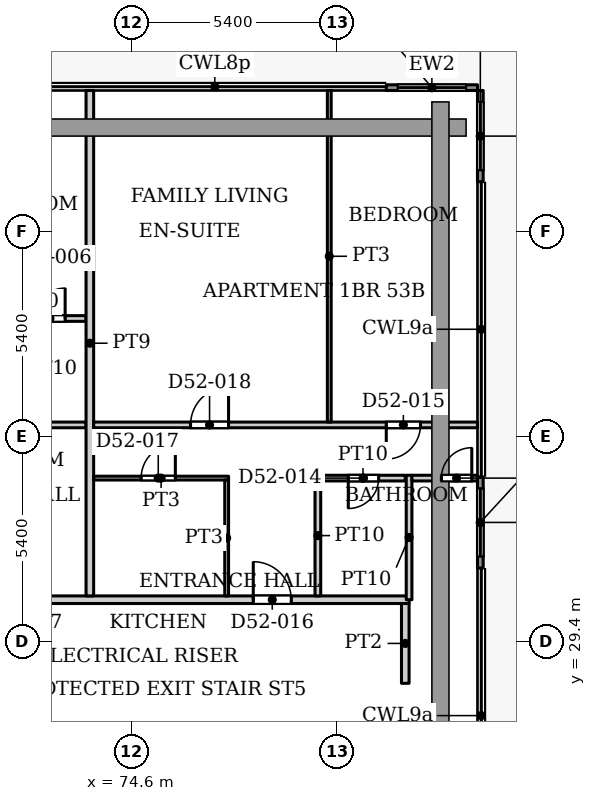
"""IFC4 building model, lengths in metres.
Left out: names, types, materials, properties, quantities, classifications, styles, units other than length and angle.
Written with IfcOpenShell. Run it as: python <this file> out.ifc"""

import sys

from ifc_helpers import new_model, si_unit, direction, frame, frame_2d, origin, place, context, subcontext, project, spatial, rectangle, extrude, source, transform, mapped, element, fill, save


model = new_model("IFC4")
c1 = context("Model", 3, precision=1e-05, world=origin(), true_north=direction((0.0, 1.0)))
c2 = subcontext(c1, "Body", "Model", "MODEL_VIEW")
j1 = project(units=[si_unit("LENGTHUNIT", "METRE"), si_unit("PLANEANGLEUNIT", "RADIAN")], contexts=[c1])
p1 = place(None, origin())
s1 = spatial("IfcSite", under=j1, at=p1, CompositionType="ELEMENT")
p2 = place(p1, origin())
s2 = spatial("IfcBuilding", under=s1, at=p2, CompositionType="ELEMENT")
p3 = place(p2, frame((0.0, 0.0, 227.9)))
s3 = spatial("IfcBuildingStorey", under=s2, at=p3, CompositionType="ELEMENT", Elevation=227.9)
p4 = place(p3, frame((81.3, 43.975, 0.0), z_axis=(0.0, 0.0, 1.0), x_axis=(1.0, 0.0, 0.0)))
e1 = element("IfcWall", 1, at=p4, inside=s3, PredefinedType="SOLIDWALL", context=c2, shape_type="SweptSolid", body=[
    extrude(rectangle(XDim=2.4, YDim=0.15, at=frame_2d((1.2, 0.0))), origin(), (0.0, 0.0, 1.0), 3.75),
])
p5 = place(p4, frame((0.3, 0.0, 0.0)))
e2 = element("IfcOpeningElement", 2, at=p5, cuts=e1, PredefinedType="OPENING", context=c2, shape_type="SweptSolid", body=[
    extrude(rectangle(XDim=1.8, YDim=2.4, at=frame_2d((0.9, 1.2))), frame((0.0, 0.085, 0.0), z_axis=(0.0, -1.0, 0.0), x_axis=(1.0, 0.0, 0.0)), (0.0, 0.0, 1.0), 0.17),
])
p6 = place(p3, frame((83.775, 43.9, 0.0), z_axis=(0.0, 0.0, 1.0), x_axis=(0.0, -1.0, 0.0)))
e3 = element("IfcWall", 3, at=p6, inside=s3, PredefinedType="SOLIDWALL", context=c2, shape_type="SweptSolid", body=[
    extrude(rectangle(XDim=2.4, YDim=0.15, at=frame_2d((1.2, 0.0))), origin(), (0.0, 0.0, 1.0), 3.75),
])
p7 = place(p6, frame((0.3, 0.0, 0.0)))
e4 = element("IfcOpeningElement", 4, at=p7, cuts=e3, PredefinedType="OPENING", context=c2, shape_type="SweptSolid", body=[
    extrude(rectangle(XDim=1.8, YDim=2.4, at=frame_2d((0.9, 1.2))), frame((0.0, 0.085, 0.0), z_axis=(0.0, -1.0, 0.0), x_axis=(1.0, 0.0, 0.0)), (0.0, 0.0, 1.0), 0.17),
])
p8 = place(p3, frame((83.775, 33.733, 0.0), z_axis=(0.0, 0.0, 1.0), x_axis=(0.0, -1.0, 0.0)))
e5 = element("IfcWall", 5, at=p8, inside=s3, PredefinedType="SOLIDWALL", context=c2, shape_type="SweptSolid", body=[
    extrude(rectangle(XDim=2.399, YDim=0.15, at=frame_2d((1.199, 0.0))), origin(), (0.0, 0.0, 1.0), 3.75),
])
p9 = place(p8, frame((0.3, 0.0, 0.0)))
e6 = element("IfcOpeningElement", 6, at=p9, cuts=e5, PredefinedType="OPENING", context=c2, shape_type="SweptSolid", body=[
    extrude(rectangle(XDim=1.8, YDim=2.4, at=frame_2d((0.9, 1.2))), frame((0.0, 0.085, 0.0), z_axis=(0.0, -1.0, 0.0), x_axis=(1.0, 0.0, 0.0)), (0.0, 0.0, 1.0), 0.17),
])
p10 = place(p3, frame((53.499, 30.5, 0.0), z_axis=(0.0, 0.0, 1.0), x_axis=(1.0, 0.0, 0.0)))
e7 = element("IfcWall", 7, at=p10, inside=s3, PredefinedType="PARTITIONING", context=c2, shape_type="SweptSolid", body=[
    extrude(rectangle(XDim=28.401, YDim=0.2, at=frame_2d((14.2, 0.0))), origin(), (0.0, 0.0, 1.0), 3.6),
])
p11 = place(p10, frame((17.701, 0.0, 0.0)))
e8 = element("IfcOpeningElement", 8, at=p11, cuts=e7, PredefinedType="OPENING", context=c2, shape_type="SweptSolid", body=[
    extrude(rectangle(XDim=1.0, YDim=2.1, at=frame_2d((0.5, 1.05))), frame((0.0, 0.11, 0.0), z_axis=(0.0, -1.0, 0.0), x_axis=(1.0, 0.0, 0.0)), (0.0, 0.0, 1.0), 0.22),
])
p12 = place(p10, frame((24.301, 0.0, 0.0)))
e9 = element("IfcOpeningElement", 9, at=p12, cuts=e7, PredefinedType="OPENING", context=c2, shape_type="SweptSolid", body=[
    extrude(rectangle(XDim=1.0, YDim=2.1, at=frame_2d((0.5, 1.05))), frame((0.0, 0.11, 0.0), z_axis=(0.0, -1.0, 0.0), x_axis=(1.0, 0.0, 0.0)), (0.0, 0.0, 1.0), 0.22),
])
p13 = place(p3, frame((53.499, 35.1, 0.0), z_axis=(0.0, 0.0, 1.0), x_axis=(1.0, 0.0, 0.0)))
e10 = element("IfcWall", 10, at=p13, inside=s3, PredefinedType="PARTITIONING", context=c2, shape_type="SweptSolid", body=[
    extrude(rectangle(XDim=19.901, YDim=0.15, at=frame_2d((9.95, 0.0))), origin(), (0.0, 0.0, 1.0), 3.6),
])
p14 = place(p13, frame((8.451, 0.0, 0.0)))
e11 = element("IfcOpeningElement", 11, at=p14, cuts=e10, PredefinedType="OPENING", context=c2, shape_type="SweptSolid", body=[
    extrude(rectangle(XDim=0.9, YDim=2.1, at=frame_2d((0.45, 1.05))), frame((0.0, 0.085, 0.0), z_axis=(0.0, -1.0, 0.0), x_axis=(1.0, 0.0, 0.0)), (0.0, 0.0, 1.0), 0.17),
])
p15 = place(p13, frame((11.601, 0.0, 0.0)))
e12 = element("IfcOpeningElement", 12, at=p15, cuts=e10, PredefinedType="OPENING", context=c2, shape_type="SweptSolid", body=[
    extrude(rectangle(XDim=0.9, YDim=2.1, at=frame_2d((0.45, 1.05))), frame((0.0, 0.085, 0.0), z_axis=(0.0, -1.0, 0.0), x_axis=(1.0, 0.0, 0.0)), (0.0, 0.0, 1.0), 0.17),
])
p16 = place(p13, frame((1.701, 0.0, 0.0)))
e13 = element("IfcOpeningElement", 13, at=p16, cuts=e10, PredefinedType="OPENING", context=c2, shape_type="SweptSolid", body=[
    extrude(rectangle(XDim=1.0, YDim=2.1, at=frame_2d((0.5, 1.05))), frame((0.0, 0.085, 0.0), z_axis=(0.0, -1.0, 0.0), x_axis=(1.0, 0.0, 0.0)), (0.0, 0.0, 1.0), 0.17),
])
p17 = place(p13, frame((4.801, 0.0, 0.0)))
e14 = element("IfcOpeningElement", 14, at=p17, cuts=e10, PredefinedType="OPENING", context=c2, shape_type="SweptSolid", body=[
    extrude(rectangle(XDim=1.6, YDim=2.1, at=frame_2d((0.8, 1.05))), frame((0.0, 0.085, 0.0), z_axis=(0.0, -1.0, 0.0), x_axis=(1.0, 0.0, 0.0)), (0.0, 0.0, 1.0), 0.17),
])
p18 = place(p13, frame((15.701, 0.0, 0.0)))
e15 = element("IfcOpeningElement", 15, at=p18, cuts=e10, PredefinedType="OPENING", context=c2, shape_type="SweptSolid", body=[
    extrude(rectangle(XDim=0.9, YDim=2.1, at=frame_2d((0.45, 1.05))), frame((0.0, 0.085, 0.0), z_axis=(0.0, -1.0, 0.0), x_axis=(1.0, 0.0, 0.0)), (0.0, 0.0, 1.0), 0.17),
])
p19 = place(p3, frame((71.475, 37.9, 0.0), z_axis=(0.0, 0.0, 1.0), x_axis=(1.0, 0.0, 0.0)))
e16 = element("IfcWall", 16, at=p19, inside=s3, PredefinedType="PARTITIONING", context=c2, shape_type="SweptSolid", body=[
    extrude(rectangle(XDim=1.925, YDim=0.15, at=frame_2d((0.962, 0.0))), origin(), (0.0, 0.0, 1.0), 3.6),
])
p20 = place(p19, frame((0.575, 0.0, 0.0)))
e17 = element("IfcOpeningElement", 17, at=p20, cuts=e16, PredefinedType="OPENING", context=c2, shape_type="SweptSolid", body=[
    extrude(rectangle(XDim=0.8, YDim=2.1, at=frame_2d((0.4, 1.05))), frame((0.0, 0.085, 0.0), z_axis=(0.0, -1.0, 0.0), x_axis=(1.0, 0.0, 0.0)), (0.0, 0.0, 1.0), 0.17),
])
p21 = place(p3, frame((73.5, 30.6, 0.0), z_axis=(0.0, 0.0, 1.0), x_axis=(0.0, 1.0, 0.0)))
e18 = element("IfcWall", 18, at=p21, inside=s3, PredefinedType="PARTITIONING", context=c2, shape_type="SweptSolid", body=[
    extrude(rectangle(XDim=13.3, YDim=0.2, at=frame_2d((6.65, 0.0))), origin(), (0.0, 0.0, 1.0), 3.6),
])
p22 = place(p3, frame((73.6, 33.7, 0.0), z_axis=(0.0, 0.0, 1.0), x_axis=(1.0, 0.0, 0.0)))
e19 = element("IfcWall", 19, at=p22, inside=s3, PredefinedType="PARTITIONING", context=c2, shape_type="SweptSolid", body=[
    extrude(rectangle(XDim=3.55, YDim=0.1, at=frame_2d((1.775, 0.0))), origin(), (0.0, 0.0, 1.0), 3.6),
])
p23 = place(p22, frame((1.25, 0.0, 0.0)))
e20 = element("IfcOpeningElement", 20, at=p23, cuts=e19, PredefinedType="OPENING", context=c2, shape_type="SweptSolid", body=[
    extrude(rectangle(XDim=0.9, YDim=2.1, at=frame_2d((0.45, 1.05))), frame((0.0, 0.06, 0.0), z_axis=(0.0, -1.0, 0.0), x_axis=(1.0, 0.0, 0.0)), (0.0, 0.0, 1.0), 0.12),
])
p24 = place(p3, frame((73.6, 35.1, 0.0), z_axis=(0.0, 0.0, 1.0), x_axis=(1.0, 0.0, 0.0)))
e21 = element("IfcWall", 21, at=p24, inside=s3, PredefinedType="PARTITIONING", context=c2, shape_type="SweptSolid", body=[
    extrude(rectangle(XDim=10.1, YDim=0.15, at=frame_2d((5.05, 0.0))), origin(), (0.0, 0.0, 1.0), 3.6),
])
p25 = place(p24, frame((7.7, 0.0, 0.0)))
e22 = element("IfcOpeningElement", 22, at=p25, cuts=e21, PredefinedType="OPENING", context=c2, shape_type="SweptSolid", body=[
    extrude(rectangle(XDim=0.9, YDim=2.1, at=frame_2d((0.45, 1.05))), frame((0.0, 0.085, 0.0), z_axis=(0.0, -1.0, 0.0), x_axis=(1.0, 0.0, 0.0)), (0.0, 0.0, 1.0), 0.17),
])
p26 = place(p24, frame((2.55, 0.0, 0.0)))
e23 = element("IfcOpeningElement", 23, at=p26, cuts=e21, PredefinedType="OPENING", context=c2, shape_type="SweptSolid", body=[
    extrude(rectangle(XDim=1.0, YDim=2.1, at=frame_2d((0.5, 1.05))), frame((0.0, 0.085, 0.0), z_axis=(0.0, -1.0, 0.0), x_axis=(1.0, 0.0, 0.0)), (0.0, 0.0, 1.0), 0.17),
])
p27 = place(p3, frame((77.1, 30.6, 0.0), z_axis=(0.0, 0.0, 1.0), x_axis=(0.0, 1.0, 0.0)))
e24 = element("IfcWall", 24, at=p27, inside=s3, PredefinedType="PARTITIONING", context=c2, shape_type="SweptSolid", body=[
    extrude(rectangle(XDim=3.05, YDim=0.1, at=frame_2d((1.525, 0.0))), origin(), (0.0, 0.0, 1.0), 3.6),
])
p28 = place(p3, frame((79.5, 30.6, 0.0), z_axis=(0.0, 0.0, 1.0), x_axis=(0.0, 1.0, 0.0)))
e25 = element("IfcWall", 25, at=p28, inside=s3, PredefinedType="PARTITIONING", context=c2, shape_type="SweptSolid", body=[
    extrude(rectangle(XDim=3.175, YDim=0.15, at=frame_2d((1.587, 0.0))), origin(), (0.0, 0.0, 1.0), 3.6),
])
p29 = place(p3, frame((79.575, 33.7, 0.0), z_axis=(0.0, 0.0, 1.0), x_axis=(1.0, 0.0, 0.0)))
e26 = element("IfcWall", 26, at=p29, inside=s3, PredefinedType="PARTITIONING", context=c2, shape_type="SweptSolid", body=[
    extrude(rectangle(XDim=2.225, YDim=0.15, at=frame_2d((1.113, 0.0))), origin(), (0.0, 0.0, 1.0), 3.6),
])
p30 = place(p29, frame((0.725, 0.0, 0.0)))
e27 = element("IfcOpeningElement", 27, at=p30, cuts=e26, PredefinedType="OPENING", context=c2, shape_type="SweptSolid", body=[
    extrude(rectangle(XDim=0.8, YDim=2.1, at=frame_2d((0.4, 1.05))), frame((0.0, 0.085, 0.0), z_axis=(0.0, -1.0, 0.0), x_axis=(1.0, 0.0, 0.0)), (0.0, 0.0, 1.0), 0.17),
])
p31 = place(p3, frame((79.8, 35.175, 0.0), z_axis=(0.0, 0.0, 1.0), x_axis=(0.0, 1.0, 0.0)))
e28 = element("IfcWall", 28, at=p31, inside=s3, PredefinedType="PARTITIONING", context=c2, shape_type="SweptSolid", body=[
    extrude(rectangle(XDim=8.725, YDim=0.1, at=frame_2d((4.362, 0.0))), origin(), (0.0, 0.0, 1.0), 3.6),
])
p32 = place(p3, frame((81.8, 28.3, 0.0), z_axis=(0.0, 0.0, 1.0), x_axis=(0.0, 1.0, 0.0)))
e29 = element("IfcWall", 29, at=p32, inside=s3, PredefinedType="PARTITIONING", context=c2, shape_type="SweptSolid", body=[
    extrude(rectangle(XDim=2.1, YDim=0.2, at=frame_2d((1.05, 0.0))), origin(), (0.0, 0.0, 1.0), 3.6),
])
p33 = place(p3, frame((81.9, 30.5, 0.0), z_axis=(0.0, 0.0, 1.0), x_axis=(0.0, 1.0, 0.0)))
e30 = element("IfcWall", 30, at=p33, inside=s3, PredefinedType="PARTITIONING", context=c2, shape_type="SweptSolid", body=[
    extrude(rectangle(XDim=3.275, YDim=0.15, at=frame_2d((1.637, 0.0))), origin(), (0.0, 0.0, 1.0), 3.6),
])
p34 = place(p3, frame((81.975, 33.7, 0.0), z_axis=(0.0, 0.0, 1.0), x_axis=(1.0, 0.0, 0.0)))
e31 = element("IfcWall", 31, at=p34, inside=s3, PredefinedType="PARTITIONING", context=c2, shape_type="SweptSolid", body=[
    extrude(rectangle(XDim=1.725, YDim=0.15, at=frame_2d((0.862, 0.0))), origin(), (0.0, 0.0, 1.0), 3.6),
])
p35 = place(p34, frame((0.775, 0.0, 0.0)))
e32 = element("IfcOpeningElement", 32, at=p35, cuts=e31, PredefinedType="OPENING", context=c2, shape_type="SweptSolid", body=[
    extrude(rectangle(XDim=0.8, YDim=2.1, at=frame_2d((0.4, 1.05))), frame((0.0, 0.085, 0.0), z_axis=(0.0, -1.0, 0.0), x_axis=(1.0, 0.0, 0.0)), (0.0, 0.0, 1.0), 0.17),
])
m1 = source(origin(), c2, "Body", "SweptSolid", [
    extrude(rectangle(XDim=1.8, YDim=2.4, at=frame_2d((0.9, 1.2))), frame((0.0, 0.025, 0.0), z_axis=(0.0, -1.0, 0.0), x_axis=(1.0, 0.0, 0.0)), (0.0, 0.0, 1.0), 0.05),
])
p36 = place(p5, origin())
e33 = element("IfcDoor", 33, at=p36, inside=s3, OperationType="SLIDING_TO_LEFT", PredefinedType="DOOR", context=c2, shape_type="MappedRepresentation", body=[
    mapped(m1, transform((0.0, 0.0, 0.0), x_axis=(1.0, 0.0, 0.0), y_axis=(0.0, 1.0, 0.0), z_axis=(0.0, 0.0, 1.0), scale=1.0)),
])
fill(e2, e33)
p37 = place(p7, origin())
e34 = element("IfcDoor", 34, at=p37, inside=s3, OperationType="SLIDING_TO_LEFT", PredefinedType="DOOR", context=c2, shape_type="MappedRepresentation", body=[
    mapped(m1, transform((0.0, 0.0, 0.0), x_axis=(1.0, 0.0, 0.0), y_axis=(0.0, 1.0, 0.0), z_axis=(0.0, 0.0, 1.0), scale=1.0)),
])
fill(e4, e34)
p38 = place(p9, origin())
e35 = element("IfcDoor", 35, at=p38, inside=s3, OperationType="SLIDING_TO_LEFT", PredefinedType="DOOR", context=c2, shape_type="MappedRepresentation", body=[
    mapped(m1, transform((0.0, 0.0, 0.0), x_axis=(1.0, 0.0, 0.0), y_axis=(0.0, 1.0, 0.0), z_axis=(0.0, 0.0, 1.0), scale=1.0)),
])
fill(e6, e35)
m2 = source(origin(), c2, "Body", "SweptSolid", [
    extrude(rectangle(XDim=0.8, YDim=2.1, at=frame_2d((0.4, 1.05))), frame((0.0, 0.025, 0.0), z_axis=(0.0, -1.0, 0.0), x_axis=(1.0, 0.0, 0.0)), (0.0, 0.0, 1.0), 0.05),
])
p39 = place(p20, origin())
e36 = element("IfcDoor", 36, at=p39, inside=s3, OperationType="SINGLE_SWING_LEFT", PredefinedType="DOOR", context=c2, shape_type="MappedRepresentation", body=[
    mapped(m2, transform((0.0, 0.0, 0.0), x_axis=(1.0, 0.0, 0.0), y_axis=(0.0, 1.0, 0.0), z_axis=(0.0, 0.0, 1.0), scale=1.0)),
])
fill(e17, e36)
p40 = place(p30, origin())
e37 = element("IfcDoor", 37, at=p40, inside=s3, OperationType="SINGLE_SWING_RIGHT", PredefinedType="DOOR", context=c2, shape_type="MappedRepresentation", body=[
    mapped(m2, transform((0.0, 0.0, 0.0), x_axis=(1.0, 0.0, 0.0), y_axis=(0.0, 1.0, 0.0), z_axis=(0.0, 0.0, 1.0), scale=1.0)),
])
fill(e27, e37)
m3 = source(origin(), c2, "Body", "SweptSolid", [
    extrude(rectangle(XDim=0.9, YDim=2.1, at=frame_2d((0.45, 1.05))), frame((0.0, 0.025, 0.0), z_axis=(0.0, -1.0, 0.0), x_axis=(1.0, 0.0, 0.0)), (0.0, 0.0, 1.0), 0.05),
])
p41 = place(p25, origin())
e38 = element("IfcDoor", 38, at=p41, inside=s3, OperationType="SINGLE_SWING_RIGHT", PredefinedType="DOOR", context=c2, shape_type="MappedRepresentation", body=[
    mapped(m3, transform((0.0, 0.0, 0.0), x_axis=(1.0, 0.0, 0.0), y_axis=(0.0, 1.0, 0.0), z_axis=(0.0, 0.0, 1.0), scale=1.0)),
])
fill(e22, e38)
m4 = source(origin(), c2, "Body", "SweptSolid", [
    extrude(rectangle(XDim=1.0, YDim=2.1, at=frame_2d((0.5, 1.05))), frame((0.0, 0.025, 0.0), z_axis=(0.0, -1.0, 0.0), x_axis=(1.0, 0.0, 0.0)), (0.0, 0.0, 1.0), 0.05),
])
p42 = place(p12, origin())
e39 = element("IfcDoor", 39, at=p42, inside=s3, OperationType="SINGLE_SWING_LEFT", PredefinedType="DOOR", context=c2, shape_type="MappedRepresentation", body=[
    mapped(m4, transform((0.0, 0.0, 0.0), x_axis=(1.0, 0.0, 0.0), y_axis=(0.0, 1.0, 0.0), z_axis=(0.0, 0.0, 1.0), scale=1.0)),
])
fill(e9, e39)
p43 = place(p23, origin())
e40 = element("IfcDoor", 40, at=p43, inside=s3, OperationType="SINGLE_SWING_LEFT", PredefinedType="DOOR", context=c2, shape_type="MappedRepresentation", body=[
    mapped(m3, transform((0.0, 0.0, 0.0), x_axis=(1.0, 0.0, 0.0), y_axis=(0.0, 1.0, 0.0), z_axis=(0.0, 0.0, 1.0), scale=1.0)),
])
fill(e20, e40)
m5 = source(origin(), c2, "Body", "SweptSolid", [
    extrude(rectangle(XDim=1.0, YDim=2.1, at=frame_2d((0.5, 1.05))), frame((0.0, 0.025, 0.0), z_axis=(0.0, -1.0, 0.0), x_axis=(1.0, 0.0, 0.0)), (0.0, 0.0, 1.0), 0.05),
])
p44 = place(p26, origin())
e41 = element("IfcDoor", 41, at=p44, inside=s3, OperationType="SINGLE_SWING_LEFT", PredefinedType="DOOR", context=c2, shape_type="MappedRepresentation", body=[
    mapped(m5, transform((0.0, 0.0, 0.0), x_axis=(1.0, 0.0, 0.0), y_axis=(0.0, 1.0, 0.0), z_axis=(0.0, 0.0, 1.0), scale=1.0)),
])
fill(e23, e41)
p45 = place(p35, origin())
e42 = element("IfcDoor", 42, at=p45, inside=s3, OperationType="SINGLE_SWING_LEFT", PredefinedType="DOOR", context=c2, shape_type="MappedRepresentation", body=[
    mapped(m2, transform((0.0, 0.0, 0.0), x_axis=(1.0, 0.0, 0.0), y_axis=(0.0, 1.0, 0.0), z_axis=(0.0, 0.0, 1.0), scale=1.0)),
])
fill(e32, e42)
save(model, sys.argv[1])
